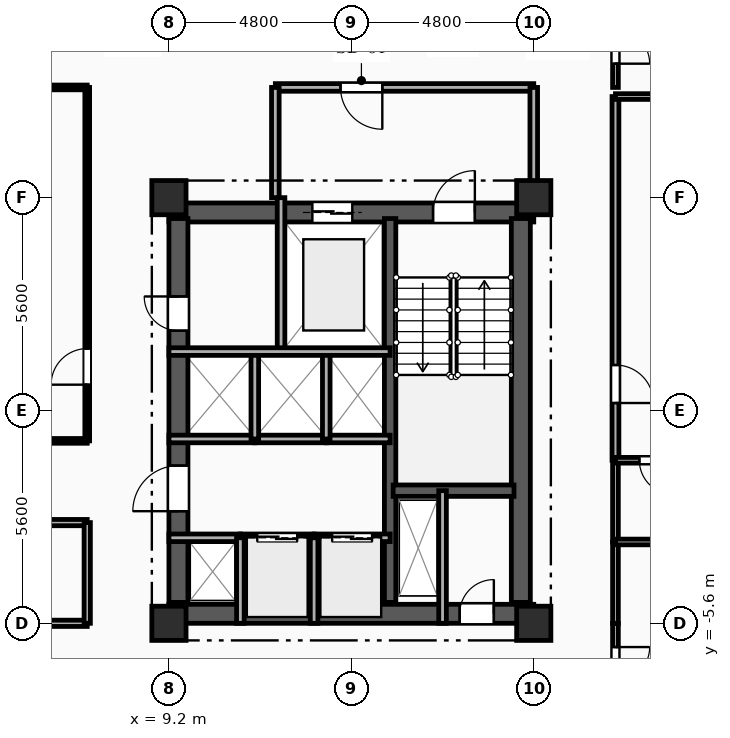
"""IFC4 building model, lengths in metres.
Left out: names, types, materials, properties, quantities, classifications, styles, units other than length and angle.
Written with IfcOpenShell. Run it as: python <this file> out.ifc"""

import sys

from ifc_helpers import new_model, si_unit, direction, frame, frame_2d, origin, origin_2d, place, context, subcontext, project, spatial, rectangle, extrude, element, fill, save


model = new_model("IFC4")
c1 = context("Model", 3, precision=1e-05, world=origin(), true_north=direction((0.0, 1.0)))
c2 = subcontext(c1, "Body", "Model", "MODEL_VIEW")
j1 = project(units=[si_unit("LENGTHUNIT", "METRE"), si_unit("PLANEANGLEUNIT", "RADIAN")], contexts=[c1])
p1 = place(None, origin())
s1 = spatial("IfcSite", under=j1, at=p1, CompositionType="ELEMENT")
p2 = place(p1, origin())
s2 = spatial("IfcBuilding", under=s1, at=p2, CompositionType="ELEMENT")
p3 = place(p2, frame((0.0, 0.0, 144.4)))
s3 = spatial("IfcBuildingStorey", under=s2, at=p3, CompositionType="ELEMENT", Elevation=144.4)
for number, where, z_axis, x_axis in (
    (1, (9.2, -5.6, 0.0), (0.0, 0.0, 1.0), (1.0, 0.0, 0.0)),
    (2, (9.2, 5.6, 0.0), (0.0, 0.0, 1.0), (1.0, 0.0, 0.0)),
    (3, (18.8, -5.6, 0.0), (0.0, 0.0, 1.0), (1.0, 0.0, 0.0)),
    (4, (18.8, 5.6, 0.0), (0.0, 0.0, 1.0), (1.0, 0.0, 0.0)),
):
    element("IfcColumn", number, at=place(p3, frame(where, z_axis=z_axis, x_axis=x_axis)), inside=s3, PredefinedType="COLUMN", context=c2, shape_type="SweptSolid", body=[
        extrude(rectangle(XDim=0.9, YDim=0.9, at=origin_2d()), origin(), (0.0, 0.0, 1.0), 3.35),
    ])
p4 = place(p3, frame((9.2, 5.21, 0.0), z_axis=(0.0, 0.0, 1.0), x_axis=(1.0, 0.0, 0.0)))
e5 = element("IfcWall", 5, at=p4, inside=s3, PredefinedType="SHEAR", context=c2, shape_type="SweptSolid", body=[
    extrude(rectangle(XDim=9.6, YDim=0.5, at=frame_2d((4.8, 0.0))), origin(), (0.0, 0.0, 1.0), 3.04),
])
p5 = place(p4, frame((6.95, 0.0, 0.0)))
e6 = element("IfcOpeningElement", 6, at=p5, cuts=e5, PredefinedType="OPENING", context=c2, shape_type="SweptSolid", body=[
    extrude(rectangle(XDim=1.1, YDim=2.15, at=frame_2d((0.55, 1.075))), frame((0.0, 0.26, 0.0), z_axis=(0.0, -1.0, 0.0), x_axis=(1.0, 0.0, 0.0)), (0.0, 0.0, 1.0), 0.52),
])
p6 = place(p4, frame((3.775, 0.0, 0.0)))
e7 = element("IfcOpeningElement", 7, at=p6, cuts=e5, PredefinedType="OPENING", context=c2, shape_type="SweptSolid", body=[
    extrude(rectangle(XDim=1.05, YDim=2.1, at=frame_2d((0.525, 1.05))), frame((0.0, 0.26, 0.0), z_axis=(0.0, -1.0, 0.0), x_axis=(1.0, 0.0, 0.0)), (0.0, 0.0, 1.0), 0.52),
])
p7 = place(p3, frame((9.2, -5.35, 0.0), z_axis=(0.0, 0.0, 1.0), x_axis=(1.0, 0.0, 0.0)))
e8 = element("IfcWall", 8, at=p7, inside=s3, PredefinedType="SHEAR", context=c2, shape_type="SweptSolid", body=[
    extrude(rectangle(XDim=9.6, YDim=0.5, at=frame_2d((4.8, 0.0))), origin(), (0.0, 0.0, 1.0), 3.04),
])
p8 = place(p7, frame((7.65, 0.0, 0.0)))
e9 = element("IfcOpeningElement", 9, at=p8, cuts=e8, PredefinedType="OPENING", context=c2, shape_type="SweptSolid", body=[
    extrude(rectangle(XDim=0.9, YDim=2.1, at=frame_2d((0.45, 1.05))), frame((0.0, 0.26, 0.0), z_axis=(0.0, -1.0, 0.0), x_axis=(1.0, 0.0, 0.0)), (0.0, 0.0, 1.0), 0.52),
])
p9 = place(p3, frame((9.45, -5.05, 0.0), z_axis=(0.0, 0.0, 1.0), x_axis=(0.0, 1.0, 0.0)))
e10 = element("IfcWall", 10, at=p9, inside=s3, PredefinedType="SHEAR", context=c2, shape_type="SweptSolid", body=[
    extrude(rectangle(XDim=10.1, YDim=0.5, at=frame_2d((5.05, 0.0))), origin(), (0.0, 0.0, 1.0), 3.04),
])
p10 = place(p9, frame((7.15, 0.0, 0.0)))
e11 = element("IfcOpeningElement", 11, at=p10, cuts=e10, PredefinedType="OPENING", context=c2, shape_type="SweptSolid", body=[
    extrude(rectangle(XDim=0.9, YDim=2.1, at=frame_2d((0.45, 1.05))), frame((0.0, 0.26, 0.0), z_axis=(0.0, -1.0, 0.0), x_axis=(1.0, 0.0, 0.0)), (0.0, 0.0, 1.0), 0.52),
])
p11 = place(p9, frame((2.4, 0.0, 0.0)))
e12 = element("IfcOpeningElement", 12, at=p11, cuts=e10, PredefinedType="OPENING", context=c2, shape_type="SweptSolid", body=[
    extrude(rectangle(XDim=1.2, YDim=2.15, at=frame_2d((0.6, 1.075))), frame((0.0, 0.26, 0.0), z_axis=(0.0, -1.0, 0.0), x_axis=(1.0, 0.0, 0.0)), (0.0, 0.0, 1.0), 0.52),
])
p12 = place(p3, frame((18.46, -5.05, 0.0), z_axis=(0.0, 0.0, 1.0), x_axis=(0.0, 1.0, 0.0)))
e13 = element("IfcWall", 13, at=p12, inside=s3, PredefinedType="SHEAR", context=c2, shape_type="SweptSolid", body=[
    extrude(rectangle(XDim=10.1, YDim=0.5, at=frame_2d((5.05, 0.0))), origin(), (0.0, 0.0, 1.0), 3.04),
])
p13 = place(p3, frame((15.02, -5.05, 0.0), z_axis=(0.0, 0.0, 1.0), x_axis=(0.0, 1.0, 0.0)))
e14 = element("IfcWall", 14, at=p13, inside=s3, PredefinedType="SHEAR", context=c2, shape_type="SweptSolid", body=[
    extrude(rectangle(XDim=10.1, YDim=0.3, at=frame_2d((5.05, 0.0))), origin(), (0.0, 0.0, 1.0), 3.04),
])
p14 = place(p3, frame((15.1, -2.11, 0.0), z_axis=(0.0, 0.0, 1.0), x_axis=(1.0, 0.0, 0.0)))
e15 = element("IfcWall", 15, at=p14, inside=s3, PredefinedType="SHEAR", context=c2, shape_type="SweptSolid", body=[
    extrude(rectangle(XDim=3.18, YDim=0.3, at=frame_2d((1.59, 0.0))), origin(), (0.0, 0.0, 1.0), 3.04),
])
p15 = place(p3, frame((16.4, -2.11, 0.0), z_axis=(0.0, 0.0, 1.0), x_axis=(0.0, -1.0, 0.0)))
e16 = element("IfcWall", 16, at=p15, inside=s3, PredefinedType="PARTITIONING", context=c2, shape_type="SweptSolid", body=[
    extrude(rectangle(XDim=3.49, YDim=0.2, at=frame_2d((1.745, 0.0))), origin(), (0.0, 0.0, 1.0), 3.04),
])
p16 = place(p3, frame((12.15, 5.6, 0.0), z_axis=(0.0, 0.0, 1.0), x_axis=(0.0, -1.0, 0.0)))
e17 = element("IfcWall", 17, at=p16, inside=s3, PredefinedType="PARTITIONING", context=c2, shape_type="SweptSolid", body=[
    extrude(rectangle(XDim=4.05, YDim=0.2, at=frame_2d((2.025, 0.0))), origin(), (0.0, 0.0, 1.0), 3.04),
])
p17 = place(p3, frame((18.8, 8.5, 0.0), z_axis=(0.0, 0.0, 1.0), x_axis=(-1.0, 0.0, 0.0)))
e18 = element("IfcWall", 18, at=p17, inside=s3, PredefinedType="PARTITIONING", context=c2, shape_type="SweptSolid", body=[
    extrude(rectangle(XDim=6.8, YDim=0.2, at=frame_2d((3.4, 0.0))), origin(), (0.0, 0.0, 1.0), 3.04),
])
p18 = place(p17, frame((3.985, 0.0, 0.0)))
e19 = element("IfcOpeningElement", 19, at=p18, cuts=e18, PredefinedType="OPENING", context=c2, shape_type="SweptSolid", body=[
    extrude(rectangle(XDim=1.1, YDim=2.15, at=frame_2d((0.55, 1.075))), frame((0.0, 0.11, 0.0), z_axis=(0.0, -1.0, 0.0), x_axis=(1.0, 0.0, 0.0)), (0.0, 0.0, 1.0), 0.22),
])
p19 = place(p3, frame((18.8, 5.6, 0.0), z_axis=(0.0, 0.0, 1.0), x_axis=(0.0, 1.0, 0.0)))
e20 = element("IfcWall", 20, at=p19, inside=s3, PredefinedType="PARTITIONING", context=c2, shape_type="SweptSolid", body=[
    extrude(rectangle(XDim=2.9, YDim=0.2, at=frame_2d((1.45, 0.0))), origin(), (0.0, 0.0, 1.0), 2.525),
])
p20 = place(p3, frame((12.0, 8.5, 0.0), z_axis=(0.0, 0.0, 1.0), x_axis=(0.0, -1.0, 0.0)))
e21 = element("IfcWall", 21, at=p20, inside=s3, PredefinedType="PARTITIONING", context=c2, shape_type="SweptSolid", body=[
    extrude(rectangle(XDim=2.9, YDim=0.2, at=frame_2d((1.45, 0.0))), origin(), (0.0, 0.0, 1.0), 3.04),
])
p21 = place(p3, frame((9.2, -3.35, 0.0), z_axis=(0.0, 0.0, 1.0), x_axis=(1.0, 0.0, 0.0)))
e22 = element("IfcWall", 22, at=p21, inside=s3, PredefinedType="PARTITIONING", context=c2, shape_type="SweptSolid", body=[
    extrude(rectangle(XDim=1.88, YDim=0.2, at=frame_2d((0.94, 0.0))), origin(), (0.0, 0.0, 1.0), 2.755),
])
p22 = place(p3, frame((11.08, -3.35, 0.0), z_axis=(0.0, 0.0, 1.0), x_axis=(1.0, 0.0, 0.0)))
e23 = element("IfcWall", 23, at=p22, inside=s3, PredefinedType="PARTITIONING", context=c2, shape_type="SweptSolid", body=[
    extrude(rectangle(XDim=1.94, YDim=0.2, at=frame_2d((0.97, 0.0))), origin(), (0.0, 0.0, 1.0), 3.04),
])
p23 = place(p22, frame((0.445, 0.0, 0.0)))
e24 = element("IfcOpeningElement", 24, at=p23, cuts=e23, PredefinedType="OPENING", context=c2, shape_type="SweptSolid", body=[
    extrude(rectangle(XDim=1.05, YDim=2.1, at=frame_2d((0.525, 1.05))), frame((0.0, 0.11, 0.0), z_axis=(0.0, -1.0, 0.0), x_axis=(1.0, 0.0, 0.0)), (0.0, 0.0, 1.0), 0.22),
])
p24 = place(p3, frame((13.02, -3.35, 0.0), z_axis=(0.0, 0.0, 1.0), x_axis=(1.0, 0.0, 0.0)))
e25 = element("IfcWall", 25, at=p24, inside=s3, PredefinedType="PARTITIONING", context=c2, shape_type="SweptSolid", body=[
    extrude(rectangle(XDim=2.0, YDim=0.2, at=frame_2d((1.0, 0.0))), origin(), (0.0, 0.0, 1.0), 3.04),
])
p25 = place(p24, frame((0.475, 0.0, 0.0)))
e26 = element("IfcOpeningElement", 26, at=p25, cuts=e25, PredefinedType="OPENING", context=c2, shape_type="SweptSolid", body=[
    extrude(rectangle(XDim=1.05, YDim=2.1, at=frame_2d((0.525, 1.05))), frame((0.0, 0.11, 0.0), z_axis=(0.0, -1.0, 0.0), x_axis=(1.0, 0.0, 0.0)), (0.0, 0.0, 1.0), 0.22),
])
p26 = place(p3, frame((11.46, -0.75, 0.0), z_axis=(0.0, 0.0, 1.0), x_axis=(-1.0, 0.0, 0.0)))
e27 = element("IfcWall", 27, at=p26, inside=s3, PredefinedType="PARTITIONING", context=c2, shape_type="SweptSolid", body=[
    extrude(rectangle(XDim=2.26, YDim=0.2, at=frame_2d((1.13, 0.0))), origin(), (0.0, 0.0, 1.0), 3.04),
])
p27 = place(p3, frame((13.34, -0.75, 0.0), z_axis=(0.0, 0.0, 1.0), x_axis=(-1.0, 0.0, 0.0)))
e28 = element("IfcWall", 28, at=p27, inside=s3, PredefinedType="PARTITIONING", context=c2, shape_type="SweptSolid", body=[
    extrude(rectangle(XDim=1.88, YDim=0.2, at=frame_2d((0.94, 0.0))), origin(), (0.0, 0.0, 1.0), 3.04),
])
p28 = place(p3, frame((15.02, -0.75, 0.0), z_axis=(0.0, 0.0, 1.0), x_axis=(-1.0, 0.0, 0.0)))
e29 = element("IfcWall", 29, at=p28, inside=s3, PredefinedType="PARTITIONING", context=c2, shape_type="SweptSolid", body=[
    extrude(rectangle(XDim=1.68, YDim=0.2, at=frame_2d((0.84, 0.0))), origin(), (0.0, 0.0, 1.0), 3.04),
])
for number, where, z_axis, x_axis in (
    (30, (11.08, -5.6, 0.0), (0.0, 0.0, 1.0), (0.0, 1.0, 0.0)),
    (31, (13.02, -5.6, 0.0), (0.0, 0.0, 1.0), (0.0, 1.0, 0.0)),
):
    element("IfcWall", number, at=place(p3, frame(where, z_axis=z_axis, x_axis=x_axis)), inside=s3, PredefinedType="PARTITIONING", context=c2, shape_type="SweptSolid", body=[
        extrude(rectangle(XDim=2.25, YDim=0.2, at=frame_2d((1.125, 0.0))), origin(), (0.0, 0.0, 1.0), 3.04),
    ])
for number, where, z_axis, x_axis in (
    (32, (11.46, -0.75, 0.0), (0.0, 0.0, 1.0), (0.0, 1.0, 0.0)),
    (33, (13.34, -0.75, 0.0), (0.0, 0.0, 1.0), (0.0, 1.0, 0.0)),
):
    element("IfcWall", number, at=place(p3, frame(where, z_axis=z_axis, x_axis=x_axis)), inside=s3, PredefinedType="PARTITIONING", context=c2, shape_type="SweptSolid", body=[
        extrude(rectangle(XDim=2.3, YDim=0.2, at=frame_2d((1.15, 0.0))), origin(), (0.0, 0.0, 1.0), 3.04),
    ])
p29 = place(p3, frame((20.95, 10.65, 0.0), z_axis=(0.0, 0.0, 1.0), x_axis=(0.0, -1.0, 0.0)))
e34 = element("IfcWall", 34, at=p29, inside=s3, PredefinedType="PARTITIONING", context=c2, shape_type="SweptSolid", body=[
    extrude(rectangle(XDim=2.15, YDim=0.15, at=frame_2d((1.075, 0.0))), origin(), (0.0, 0.0, 1.0), 3.04),
])
p30 = place(p29, frame((0.625, 0.0, 0.0)))
e35 = element("IfcOpeningElement", 35, at=p30, cuts=e34, PredefinedType="OPENING", context=c2, shape_type="SweptSolid", body=[
    extrude(rectangle(XDim=0.9, YDim=2.1, at=frame_2d((0.45, 1.05))), frame((0.0, 0.085, 0.0), z_axis=(0.0, -1.0, 0.0), x_axis=(1.0, 0.0, 0.0)), (0.0, 0.0, 1.0), 0.17),
])
p31 = place(p3, frame((7.05, 8.5, 0.0), z_axis=(0.0, 0.0, 1.0), x_axis=(-1.0, 0.0, 0.0)))
e36 = element("IfcWall", 36, at=p31, inside=s3, PredefinedType="PARTITIONING", context=c2, shape_type="SweptSolid", body=[
    extrude(rectangle(XDim=7.05, YDim=0.125, at=frame_2d((3.525, 0.0))), origin(), (0.0, 0.0, 1.0), 3.04),
])
p32 = place(p3, frame((20.95, -5.6, 0.0), z_axis=(0.0, 0.0, 1.0), x_axis=(0.0, -1.0, 0.0)))
e37 = element("IfcWall", 37, at=p32, inside=s3, PredefinedType="PARTITIONING", context=c2, shape_type="SweptSolid", body=[
    extrude(rectangle(XDim=2.15, YDim=0.15, at=frame_2d((1.075, 0.0))), origin(), (0.0, 0.0, 1.0), 3.04),
])
p33 = place(p32, frame((0.625, 0.0, 0.0)))
e38 = element("IfcOpeningElement", 38, at=p33, cuts=e37, PredefinedType="OPENING", context=c2, shape_type="SweptSolid", body=[
    extrude(rectangle(XDim=0.9, YDim=2.1, at=frame_2d((0.45, 1.05))), frame((0.0, 0.085, 0.0), z_axis=(0.0, -1.0, 0.0), x_axis=(1.0, 0.0, 0.0)), (0.0, 0.0, 1.0), 0.17),
])
p34 = place(p3, frame((0.0, -5.6, 0.0), z_axis=(0.0, 0.0, 1.0), x_axis=(1.0, 0.0, 0.0)))
e39 = element("IfcWall", 39, at=p34, inside=s3, PredefinedType="PARTITIONING", context=c2, shape_type="SweptSolid", body=[
    extrude(rectangle(XDim=7.05, YDim=0.165, at=frame_2d((3.525, 0.0))), origin(), (0.0, 0.0, 1.0), 2.525),
])
p35 = place(p3, frame((20.95, -3.46, 0.0), z_axis=(0.0, 0.0, 1.0), x_axis=(0.0, -1.0, 0.0)))
e40 = element("IfcWall", 40, at=p35, inside=s3, PredefinedType="PARTITIONING", context=c2, shape_type="SweptSolid", body=[
    extrude(rectangle(XDim=2.14, YDim=0.15, at=frame_2d((1.07, 0.0))), origin(), (0.0, 0.0, 1.0), 3.04),
])
p36 = place(p3, frame((20.95, 8.26, 0.0), z_axis=(0.0, 0.0, 1.0), x_axis=(0.0, -1.0, 0.0)))
e41 = element("IfcWall", 41, at=p36, inside=s3, PredefinedType="PARTITIONING", context=c2, shape_type="SweptSolid", body=[
    extrude(rectangle(XDim=9.57, YDim=0.18, at=frame_2d((4.785, 0.0))), origin(), (0.0, 0.0, 1.0), 3.04),
])
p37 = place(p36, frame((7.064, 0.0, 0.0)))
e42 = element("IfcOpeningElement", 42, at=p37, cuts=e41, PredefinedType="OPENING", context=c2, shape_type="SweptSolid", body=[
    extrude(rectangle(XDim=1.0, YDim=2.15, at=frame_2d((0.5, 1.075))), frame((0.0, 0.1, 0.0), z_axis=(0.0, -1.0, 0.0), x_axis=(1.0, 0.0, 0.0)), (0.0, 0.0, 1.0), 0.2),
])
p38 = place(p3, frame((20.95, -1.31, 0.0), z_axis=(0.0, 0.0, 1.0), x_axis=(0.0, -1.0, 0.0)))
e43 = element("IfcWall", 43, at=p38, inside=s3, PredefinedType="PLUMBINGWALL", context=c2, shape_type="SweptSolid", body=[
    extrude(rectangle(XDim=2.15, YDim=0.15, at=frame_2d((1.075, 0.0))), origin(), (0.0, 0.0, 1.0), 3.04),
])
p39 = place(p3, frame((0.0, -0.8, 0.0), z_axis=(0.0, 0.0, 1.0), x_axis=(1.0, 0.0, 0.0)))
e44 = element("IfcWall", 44, at=p39, inside=s3, PredefinedType="PARTITIONING", context=c2, shape_type="SweptSolid", body=[
    extrude(rectangle(XDim=7.05, YDim=0.125, at=frame_2d((3.525, 0.0))), origin(), (0.0, 0.0, 1.0), 3.04),
])
p40 = place(p3, frame((7.05, -2.95, 0.0), z_axis=(0.0, 0.0, 1.0), x_axis=(-1.0, 0.0, 0.0)))
e45 = element("IfcWall", 45, at=p40, inside=s3, PredefinedType="PARTITIONING", context=c2, shape_type="SweptSolid", body=[
    extrude(rectangle(XDim=14.1, YDim=0.165, at=frame_2d((7.05, 0.0))), origin(), (0.0, 0.0, 1.0), 3.04),
])
p41 = place(p40, frame((6.475, 0.0, 0.0)))
e46 = element("IfcOpeningElement", 46, at=p41, cuts=e45, PredefinedType="OPENING", context=c2, shape_type="SweptSolid", body=[
    extrude(rectangle(XDim=1.15, YDim=2.15, at=frame_2d((0.575, 1.075))), frame((0.0, 0.093, 0.0), z_axis=(0.0, -1.0, 0.0), x_axis=(1.0, 0.0, 0.0)), (0.0, 0.0, 1.0), 0.185),
])
p42 = place(p3, frame((7.05, -0.8, 0.0), z_axis=(0.0, 0.0, 1.0), x_axis=(0.0, 1.0, 0.0)))
e47 = element("IfcWall", 47, at=p42, inside=s3, PredefinedType="PARTITIONING", context=c2, shape_type="SweptSolid", body=[
    extrude(rectangle(XDim=9.3, YDim=0.125, at=frame_2d((4.65, 0.0))), origin(), (0.0, 0.0, 1.0), 3.04),
])
p43 = place(p42, frame((1.479, 0.0, 0.0)))
e48 = element("IfcOpeningElement", 48, at=p43, cuts=e47, PredefinedType="OPENING", context=c2, shape_type="SweptSolid", body=[
    extrude(rectangle(XDim=0.95, YDim=2.1, at=frame_2d((0.475, 1.05))), frame((0.0, 0.073, 0.0), z_axis=(0.0, -1.0, 0.0), x_axis=(1.0, 0.0, 0.0)), (0.0, 0.0, 1.0), 0.145),
])
p44 = place(p3, frame((7.05, -5.6, 0.0), z_axis=(0.0, 0.0, 1.0), x_axis=(0.0, 1.0, 0.0)))
e49 = element("IfcWall", 49, at=p44, inside=s3, PredefinedType="PARTITIONING", context=c2, shape_type="SweptSolid", body=[
    extrude(rectangle(XDim=2.65, YDim=0.165, at=frame_2d((1.325, 0.0))), origin(), (0.0, 0.0, 1.0), 3.04),
])
p45 = place(p3, frame((20.95, -3.46, 0.0), z_axis=(0.0, 0.0, 1.0), x_axis=(1.0, 0.0, 0.0)))
e50 = element("IfcWall", 50, at=p45, inside=s3, PredefinedType="PLUMBINGWALL", context=c2, shape_type="SweptSolid", body=[
    extrude(rectangle(XDim=2.45, YDim=0.15, at=frame_2d((1.225, 0.0))), origin(), (0.0, 0.0, 1.0), 3.04),
])
p46 = place(p3, frame((23.4, -1.31, 0.0), z_axis=(0.0, 0.0, 1.0), x_axis=(-1.0, 0.0, 0.0)))
e51 = element("IfcWall", 51, at=p46, inside=s3, PredefinedType="PLUMBINGWALL", context=c2, shape_type="SweptSolid", body=[
    extrude(rectangle(XDim=2.45, YDim=0.15, at=frame_2d((1.225, 0.0))), origin(), (0.0, 0.0, 1.0), 3.04),
])
p47 = place(p46, frame((0.921, 0.0, 0.0)))
e52 = element("IfcOpeningElement", 52, at=p47, cuts=e51, PredefinedType="OPENING", context=c2, shape_type="SweptSolid", body=[
    extrude(rectangle(XDim=0.9, YDim=2.1, at=frame_2d((0.45, 1.05))), frame((0.0, 0.085, 0.0), z_axis=(0.0, -1.0, 0.0), x_axis=(1.0, 0.0, 0.0)), (0.0, 0.0, 1.0), 0.17),
])
p48 = place(p3, frame((20.95, 8.26, 0.0), z_axis=(0.0, 0.0, 1.0), x_axis=(1.0, 0.0, 0.0)))
e53 = element("IfcWall", 53, at=p48, inside=s3, PredefinedType="PARTITIONING", context=c2, shape_type="SweptSolid", body=[
    extrude(rectangle(XDim=6.05, YDim=0.15, at=frame_2d((3.025, 0.0))), origin(), (0.0, 0.0, 1.0), 3.04),
])
p49 = place(p3, frame((9.2, 1.55, 0.0), z_axis=(0.0, 0.0, 1.0), x_axis=(1.0, 0.0, 0.0)))
e54 = element("IfcWall", 54, at=p49, inside=s3, PredefinedType="PARTITIONING", context=c2, shape_type="SweptSolid", body=[
    extrude(rectangle(XDim=5.82, YDim=0.2, at=frame_2d((2.91, 0.0))), origin(), (0.0, 0.0, 1.0), 3.04),
])
p50 = place(p5, origin())
e55 = element("IfcDoor", 55, at=p50, inside=s3, OperationType="SINGLE_SWING_RIGHT", PredefinedType="DOOR", context=c2, shape_type="SweptSolid", body=[
    extrude(rectangle(XDim=1.1, YDim=2.15, at=frame_2d((0.55, 1.075))), frame((0.0, 0.025, 0.0), z_axis=(0.0, -1.0, 0.0), x_axis=(1.0, 0.0, 0.0)), (0.0, 0.0, 1.0), 0.05),
])
fill(e6, e55)
p51 = place(p6, origin())
e56 = element("IfcDoor", 56, at=p51, inside=s3, OperationType="DOUBLE_DOOR_SLIDING", PredefinedType="DOOR", context=c2, shape_type="SweptSolid", body=[
    extrude(rectangle(XDim=1.05, YDim=2.1, at=frame_2d((0.525, 1.05))), frame((0.0, 0.025, 0.0), z_axis=(0.0, -1.0, 0.0), x_axis=(1.0, 0.0, 0.0)), (0.0, 0.0, 1.0), 0.05),
])
fill(e7, e56)
p52 = place(p8, origin())
e57 = element("IfcDoor", 57, at=p52, inside=s3, OperationType="SINGLE_SWING_RIGHT", PredefinedType="DOOR", context=c2, shape_type="SweptSolid", body=[
    extrude(rectangle(XDim=0.9, YDim=2.1, at=frame_2d((0.45, 1.05))), frame((0.0, 0.025, 0.0), z_axis=(0.0, -1.0, 0.0), x_axis=(1.0, 0.0, 0.0)), (0.0, 0.0, 1.0), 0.05),
])
fill(e9, e57)
p53 = place(p18, origin())
e58 = element("IfcDoor", 58, at=p53, inside=s3, OperationType="SINGLE_SWING_LEFT", PredefinedType="DOOR", context=c2, shape_type="SweptSolid", body=[
    extrude(rectangle(XDim=1.1, YDim=2.15, at=frame_2d((0.55, 1.075))), frame((0.0, 0.025, 0.0), z_axis=(0.0, -1.0, 0.0), x_axis=(1.0, 0.0, 0.0)), (0.0, 0.0, 1.0), 0.05),
])
fill(e19, e58)
p54 = place(p10, origin())
e59 = element("IfcDoor", 59, at=p54, inside=s3, OperationType="SINGLE_SWING_RIGHT", PredefinedType="DOOR", context=c2, shape_type="SweptSolid", body=[
    extrude(rectangle(XDim=0.9, YDim=2.1, at=frame_2d((0.45, 1.05))), frame((0.0, 0.025, 0.0), z_axis=(0.0, -1.0, 0.0), x_axis=(1.0, 0.0, 0.0)), (0.0, 0.0, 1.0), 0.05),
])
fill(e11, e59)
p55 = place(p23, origin())
e60 = element("IfcDoor", 60, at=p55, inside=s3, OperationType="DOUBLE_DOOR_SLIDING", PredefinedType="DOOR", context=c2, shape_type="SweptSolid", body=[
    extrude(rectangle(XDim=1.05, YDim=2.1, at=frame_2d((0.525, 1.05))), frame((0.0, 0.025, 0.0), z_axis=(0.0, -1.0, 0.0), x_axis=(1.0, 0.0, 0.0)), (0.0, 0.0, 1.0), 0.05),
])
fill(e24, e60)
p56 = place(p25, origin())
e61 = element("IfcDoor", 61, at=p56, inside=s3, OperationType="DOUBLE_DOOR_SLIDING", PredefinedType="DOOR", context=c2, shape_type="SweptSolid", body=[
    extrude(rectangle(XDim=1.05, YDim=2.1, at=frame_2d((0.525, 1.05))), frame((0.0, 0.025, 0.0), z_axis=(0.0, -1.0, 0.0), x_axis=(1.0, 0.0, 0.0)), (0.0, 0.0, 1.0), 0.05),
])
fill(e26, e61)
p57 = place(p11, origin())
e62 = element("IfcDoor", 62, at=p57, inside=s3, OperationType="SINGLE_SWING_LEFT", PredefinedType="DOOR", context=c2, shape_type="SweptSolid", body=[
    extrude(rectangle(XDim=1.2, YDim=2.15, at=frame_2d((0.6, 1.075))), frame((0.0, 0.025, 0.0), z_axis=(0.0, -1.0, 0.0), x_axis=(1.0, 0.0, 0.0)), (0.0, 0.0, 1.0), 0.05),
])
fill(e12, e62)
p58 = place(p30, origin())
e63 = element("IfcDoor", 63, at=p58, inside=s3, OperationType="SINGLE_SWING_RIGHT", PredefinedType="DOOR", context=c2, shape_type="SweptSolid", body=[
    extrude(rectangle(XDim=0.9, YDim=2.1, at=frame_2d((0.45, 1.05))), frame((0.0, 0.025, 0.0), z_axis=(0.0, -1.0, 0.0), x_axis=(1.0, 0.0, 0.0)), (0.0, 0.0, 1.0), 0.05),
])
fill(e35, e63)
p59 = place(p33, origin())
e64 = element("IfcDoor", 64, at=p59, inside=s3, OperationType="SINGLE_SWING_LEFT", PredefinedType="DOOR", context=c2, shape_type="SweptSolid", body=[
    extrude(rectangle(XDim=0.9, YDim=2.1, at=frame_2d((0.45, 1.05))), frame((0.0, 0.025, 0.0), z_axis=(0.0, -1.0, 0.0), x_axis=(1.0, 0.0, 0.0)), (0.0, 0.0, 1.0), 0.05),
])
fill(e38, e64)
p60 = place(p37, origin())
e65 = element("IfcDoor", 65, at=p60, inside=s3, OperationType="SINGLE_SWING_RIGHT", PredefinedType="DOOR", context=c2, shape_type="SweptSolid", body=[
    extrude(rectangle(XDim=1.0, YDim=2.15, at=frame_2d((0.5, 1.075))), frame((0.0, 0.025, 0.0), z_axis=(0.0, -1.0, 0.0), x_axis=(1.0, 0.0, 0.0)), (0.0, 0.0, 1.0), 0.05),
])
fill(e42, e65)
p61 = place(p43, origin())
e66 = element("IfcDoor", 66, at=p61, inside=s3, OperationType="SINGLE_SWING_LEFT", PredefinedType="DOOR", context=c2, shape_type="SweptSolid", body=[
    extrude(rectangle(XDim=0.95, YDim=2.1, at=frame_2d((0.475, 1.05))), frame((0.0, 0.025, 0.0), z_axis=(0.0, -1.0, 0.0), x_axis=(1.0, 0.0, 0.0)), (0.0, 0.0, 1.0), 0.05),
])
fill(e48, e66)
p62 = place(p47, origin())
e67 = element("IfcDoor", 67, at=p62, inside=s3, OperationType="SINGLE_SWING_LEFT", PredefinedType="DOOR", context=c2, shape_type="SweptSolid", body=[
    extrude(rectangle(XDim=0.9, YDim=2.1, at=frame_2d((0.45, 1.05))), frame((0.0, 0.025, 0.0), z_axis=(0.0, -1.0, 0.0), x_axis=(1.0, 0.0, 0.0)), (0.0, 0.0, 1.0), 0.05),
])
fill(e52, e67)
save(model, sys.argv[1])
